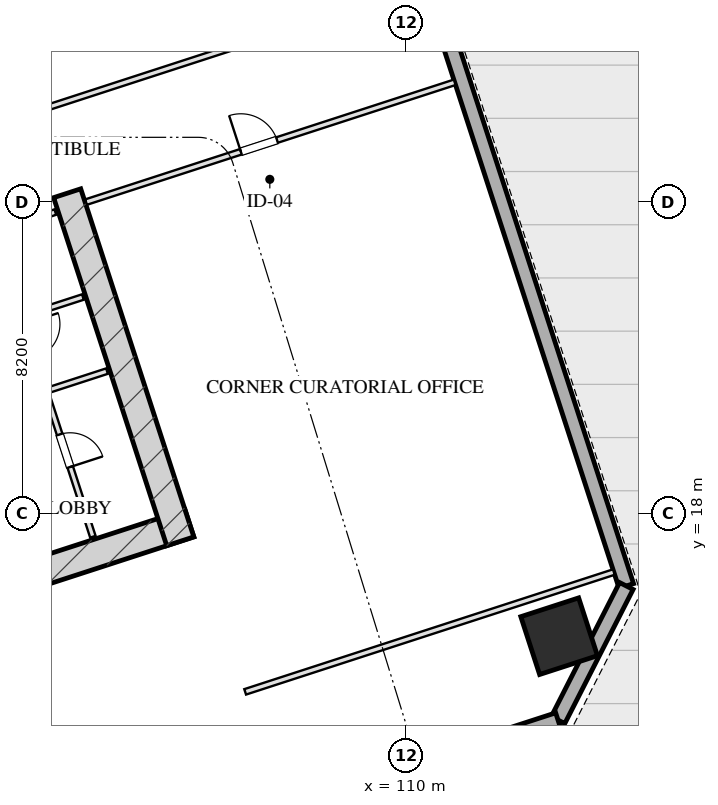
"""IFC4 building model, lengths in metres.
Left out: names, types, materials, properties, quantities, classifications, styles, units other than length and angle.
Written with IfcOpenShell. Run it as: python <this file> out.ifc"""

import sys

from ifc_helpers import new_model, si_unit, direction, frame, frame_2d, origin, origin_2d, place, context, subcontext, project, spatial, rectangle, hollow_rectangle, extrude, element, fill, save


model = new_model("IFC4")
c1 = context("Model", 3, precision=1e-05, world=origin(), true_north=direction((0.0, 1.0)))
c2 = subcontext(c1, "Body", "Model", "MODEL_VIEW")
j1 = project(units=[si_unit("LENGTHUNIT", "METRE"), si_unit("PLANEANGLEUNIT", "RADIAN")], contexts=[c1])
p1 = place(None, origin())
s1 = spatial("IfcSite", under=j1, at=p1, CompositionType="ELEMENT")
p2 = place(p1, origin())
s2 = spatial("IfcBuilding", under=s1, at=p2, CompositionType="ELEMENT")
p3 = place(p2, frame((0.0, 0.0, 26.0)))
s3 = spatial("IfcBuildingStorey", under=s2, at=p3, CompositionType="ELEMENT", Elevation=26.0)
p4 = place(p3, frame((88.559, 12.629, 0.0), z_axis=(0.0, 0.0, 1.0), x_axis=(0.951056072937, 0.309018358888, 0.0)))
e1 = element("IfcWall", 1, at=p4, inside=s3, PredefinedType="SHEAR", context=c2, shape_type="SweptSolid", body=[
    extrude(rectangle(XDim=16.55, YDim=0.75, at=frame_2d((8.275, 0.0))), origin(), (0.0, 0.0, 1.0), 4.0),
])
p5 = place(p3, frame((101.082, 26.429, 0.0), z_axis=(0.0, 0.0, 1.0), x_axis=(0.309016134813, -0.951056795583, 0.0)))
e2 = element("IfcWall", 2, at=p5, inside=s3, PredefinedType="SHEAR", context=c2, shape_type="SweptSolid", body=[
    extrude(rectangle(XDim=9.63, YDim=0.75, at=frame_2d((4.815, 0.0))), origin(), (0.0, 0.0, 1.0), 4.0),
])
p6 = place(p3, frame((114.027, 14.774, 0.0), z_axis=(0.0, 0.0, 1.0), x_axis=(0.951056516295, 0.309016994375, 0.0)))
e3 = element("IfcColumn", 3, at=p6, inside=s3, PredefinedType="COLUMN", context=c2, shape_type="SweptSolid", body=[
    extrude(hollow_rectangle(XDim=1.6, YDim=1.6, WallThickness=0.055, at=origin_2d()), origin(), (0.0, 0.0, 1.0), 4.001),
])
p7 = place(p3, frame((100.345, 63.648, 0.0), z_axis=(0.0, 0.0, 1.0), x_axis=(0.309014526607, -0.951057318118, 0.0)))
e4 = element("IfcWall", 4, at=p7, inside=s3, PredefinedType="SOLIDWALL", context=c2, shape_type="SweptSolid", body=[
    extrude(rectangle(XDim=50.0, YDim=0.4, at=frame_2d((25.0, 0.0))), origin(), (0.0, 0.0, 1.0), 3.16),
])
p8 = place(p7, frame((30.15, 0.0, 0.75)))
e5 = element("IfcOpeningElement", 5, at=p8, cuts=e4, PredefinedType="OPENING", context=c2, shape_type="SweptSolid", body=[
    extrude(rectangle(XDim=2.5, YDim=1.75, at=frame_2d((1.25, 0.875))), frame((0.0, 0.21, 0.0), z_axis=(0.0, -1.0, 0.0), x_axis=(1.0, 0.0, 0.0)), (0.0, 0.0, 1.0), 0.42),
])
p9 = place(p7, frame((21.15, 0.0, 0.75)))
e6 = element("IfcOpeningElement", 6, at=p9, cuts=e4, PredefinedType="OPENING", context=c2, shape_type="SweptSolid", body=[
    extrude(rectangle(XDim=2.5, YDim=1.75, at=frame_2d((1.25, 0.875))), frame((0.0, 0.21, 0.0), z_axis=(0.0, -1.0, 0.0), x_axis=(1.0, 0.0, 0.0)), (0.0, 0.0, 1.0), 0.42),
])
p10 = place(p3, frame((115.795, 16.095, 0.0), z_axis=(0.0, 0.0, 1.0), x_axis=(-0.453958106755, -0.891023028497, 0.0)))
e7 = element("IfcWall", 7, at=p10, inside=s3, PredefinedType="SOLIDWALL", context=c2, shape_type="SweptSolid", body=[
    extrude(rectangle(XDim=3.96, YDim=0.4, at=frame_2d((1.98, 0.0))), origin(), (0.0, 0.0, 1.0), 3.16),
])
p11 = place(p3, frame((113.998, 12.567, 0.0), z_axis=(0.0, 0.0, 1.0), x_axis=(-0.951055939317, -0.309018770125, 0.0)))
e8 = element("IfcWall", 8, at=p11, inside=s3, PredefinedType="SOLIDWALL", context=c2, shape_type="SweptSolid", body=[
    extrude(rectangle(XDim=32.4, YDim=0.4, at=frame_2d((16.2, 0.0))), origin(), (0.0, 0.0, 1.0), 3.16),
])
p12 = place(p3, frame((97.727, 24.944, 0.0), z_axis=(0.0, 0.0, 1.0), x_axis=(0.951036872128, 0.309077446369, 0.0)))
e9 = element("IfcWall", 9, at=p12, inside=s3, PredefinedType="PARTITIONING", context=c2, shape_type="SweptSolid", body=[
    extrude(rectangle(XDim=3.2, YDim=0.15, at=frame_2d((1.6, 0.0))), origin(), (0.0, 0.0, 1.0), 3.725),
])
p13 = place(p12, frame((0.22, 0.0, 0.0)))
e10 = element("IfcOpeningElement", 10, at=p13, cuts=e9, PredefinedType="OPENING", context=c2, shape_type="SweptSolid", body=[
    extrude(rectangle(XDim=0.95, YDim=2.05, at=frame_2d((0.475, 1.025))), frame((0.0, 0.085, 0.0), z_axis=(0.0, -1.0, 0.0), x_axis=(1.0, 0.0, 0.0)), (0.0, 0.0, 1.0), 0.17),
])
p14 = place(p12, frame((1.95, 0.0, 0.0)))
e11 = element("IfcOpeningElement", 11, at=p14, cuts=e9, PredefinedType="OPENING", context=c2, shape_type="SweptSolid", body=[
    extrude(rectangle(XDim=0.9, YDim=2.05, at=frame_2d((0.45, 1.025))), frame((0.0, 0.085, 0.0), z_axis=(0.0, -1.0, 0.0), x_axis=(1.0, 0.0, 0.0)), (0.0, 0.0, 1.0), 0.17),
])
p15 = place(p3, frame((99.153, 25.408, 0.0), z_axis=(0.0, 0.0, 1.0), x_axis=(0.309016001439, -0.951056838919, 0.0)))
e12 = element("IfcWall", 12, at=p15, inside=s3, PredefinedType="PARTITIONING", context=c2, shape_type="SweptSolid", body=[
    extrude(rectangle(XDim=8.43, YDim=0.15, at=frame_2d((4.215, 0.0))), origin(), (0.0, 0.0, 1.0), 3.725),
])
p16 = place(p15, frame((2.55, 0.0, 0.0)))
e13 = element("IfcOpeningElement", 13, at=p16, cuts=e12, PredefinedType="OPENING", context=c2, shape_type="SweptSolid", body=[
    extrude(rectangle(XDim=0.95, YDim=2.05, at=frame_2d((0.475, 1.025))), frame((0.0, 0.085, 0.0), z_axis=(0.0, -1.0, 0.0), x_axis=(1.0, 0.0, 0.0)), (0.0, 0.0, 1.0), 0.17),
])
p17 = place(p15, frame((5.6, 0.0, 0.0)))
e14 = element("IfcOpeningElement", 14, at=p17, cuts=e12, PredefinedType="OPENING", context=c2, shape_type="SweptSolid", body=[
    extrude(rectangle(XDim=0.9, YDim=2.05, at=frame_2d((0.45, 1.025))), frame((0.0, 0.085, 0.0), z_axis=(0.0, -1.0, 0.0), x_axis=(1.0, 0.0, 0.0)), (0.0, 0.0, 1.0), 0.17),
])
for number, where, z_axis, x_axis in (
    (15, (100.513, 21.223, 0.0), (0.0, 0.0, 1.0), (0.951, 0.309, 0.0)),
    (16, (99.879, 23.173, 0.0), (0.0, 0.0, 1.0), (0.951, 0.309, 0.0)),
):
    element("IfcWall", number, at=place(p3, frame(where, z_axis=z_axis, x_axis=x_axis)), inside=s3, PredefinedType="PARTITIONING", context=c2, shape_type="SweptSolid", body=[
        extrude(rectangle(XDim=1.7, YDim=0.15, at=frame_2d((0.85, 0.0))), origin(), (0.0, 0.0, 1.0), 3.725),
    ])
p18 = place(p3, frame((105.765, 13.309, 0.0), z_axis=(0.0, 0.0, 1.0), x_axis=(0.951054294345, 0.309023832749, 0.0)))
e17 = element("IfcWall", 17, at=p18, inside=s3, PredefinedType="PARTITIONING", context=c2, shape_type="SweptSolid", body=[
    extrude(rectangle(XDim=10.2, YDim=0.15, at=frame_2d((5.1, 0.0))), origin(), (0.0, 0.0, 1.0), 3.725),
])
p19 = place(p3, frame((101.578, 26.196, 0.0), z_axis=(0.0, 0.0, 1.0), x_axis=(0.951059043131, 0.309009217467, 0.0)))
e18 = element("IfcWall", 18, at=p19, inside=s3, PredefinedType="PARTITIONING", context=c2, shape_type="SweptSolid", body=[
    extrude(rectangle(XDim=10.2, YDim=0.15, at=frame_2d((5.1, 0.0))), origin(), (0.0, 0.0, 1.0), 3.725),
])
p20 = place(p19, frame((4.284, 0.0, 0.0)))
e19 = element("IfcOpeningElement", 19, at=p20, cuts=e18, PredefinedType="OPENING", context=c2, shape_type="SweptSolid", body=[
    extrude(rectangle(XDim=1.0, YDim=2.05, at=frame_2d((0.5, 1.025))), frame((0.0, 0.085, 0.0), z_axis=(0.0, -1.0, 0.0), x_axis=(1.0, 0.0, 0.0)), (0.0, 0.0, 1.0), 0.17),
])
for number, where, z_axis, x_axis in (
    (20, (91.834, 25.848, 0.0), (0.0, 0.0, 1.0), (0.951, 0.309, 0.0)),
    (21, (90.497, 29.962, 0.0), (0.0, 0.0, 1.0), (0.951, 0.309, 0.0)),
):
    element("IfcWall", number, at=place(p3, frame(where, z_axis=z_axis, x_axis=x_axis)), inside=s3, PredefinedType="PARTITIONING", context=c2, shape_type="SweptSolid", body=[
        extrude(rectangle(XDim=19.575, YDim=0.15, at=frame_2d((9.788, 0.0))), origin(), (0.0, 0.0, 1.0), 3.725),
    ])
p21 = place(p17, origin())
e22 = element("IfcDoor", 22, at=p21, inside=s3, OperationType="SINGLE_SWING_RIGHT", PredefinedType="DOOR", context=c2, shape_type="SweptSolid", body=[
    extrude(rectangle(XDim=0.9, YDim=2.05, at=frame_2d((0.45, 1.025))), frame((0.0, 0.025, 0.0), z_axis=(0.0, -1.0, 0.0), x_axis=(1.0, 0.0, 0.0)), (0.0, 0.0, 1.0), 0.05),
])
fill(e14, e22)
p22 = place(p20, origin())
e23 = element("IfcDoor", 23, at=p22, inside=s3, OperationType="SINGLE_SWING_LEFT", PredefinedType="DOOR", context=c2, shape_type="SweptSolid", body=[
    extrude(rectangle(XDim=1.0, YDim=2.05, at=frame_2d((0.5, 1.025))), frame((0.0, 0.025, 0.0), z_axis=(0.0, -1.0, 0.0), x_axis=(1.0, 0.0, 0.0)), (0.0, 0.0, 1.0), 0.05),
])
fill(e19, e23)
save(model, sys.argv[1])
